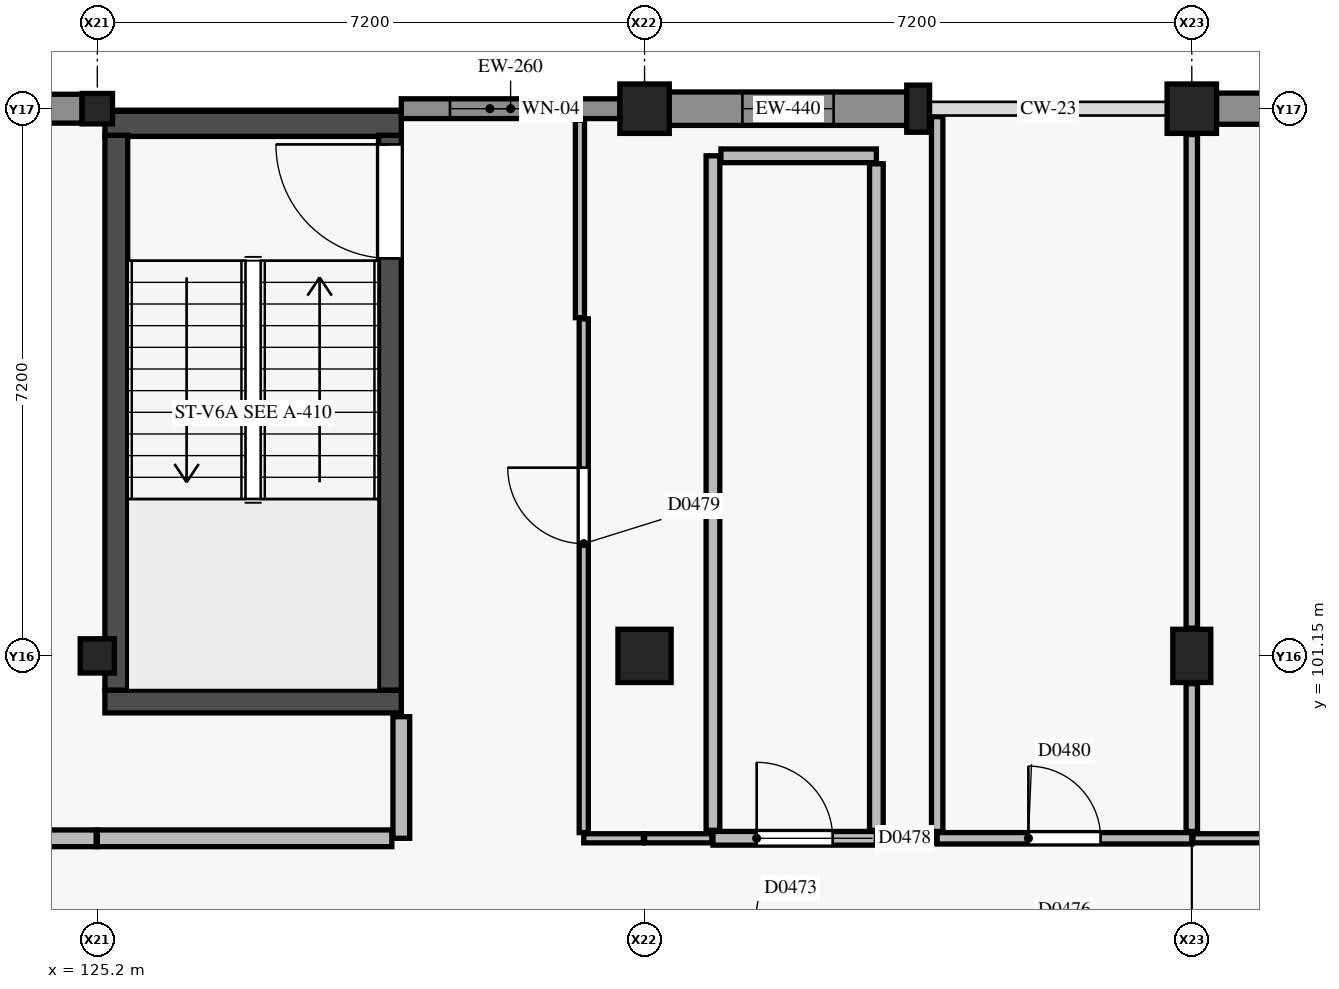
"""IFC4 building model, lengths in metres.
Left out: names, types, materials, properties, quantities, classifications, styles, units other than length and angle.
Written with IfcOpenShell. Run it as: python <this file> out.ifc"""

import sys

from ifc_helpers import new_model, si_unit, direction, frame, frame_2d, origin, origin_2d, place, context, subcontext, project, spatial, rectangle, circle, extrude, element, fill, save


model = new_model("IFC4")
c1 = context("Model", 3, precision=1e-05, world=origin(), true_north=direction((0.0, 1.0)))
c2 = subcontext(c1, "Body", "Model", "MODEL_VIEW")
j1 = project(units=[si_unit("LENGTHUNIT", "METRE"), si_unit("PLANEANGLEUNIT", "RADIAN")], contexts=[c1])
p1 = place(None, origin())
s1 = spatial("IfcSite", under=j1, at=p1, CompositionType="ELEMENT")
p2 = place(p1, origin())
s2 = spatial("IfcBuilding", under=s1, at=p2, CompositionType="ELEMENT")
p3 = place(p2, frame((0.0, 0.0, 9.0)))
s3 = spatial("IfcBuildingStorey", under=s2, at=p3, CompositionType="ELEMENT", Elevation=9.0)
p4 = place(p3, frame((125.2, 101.15, 0.0), z_axis=(0.0, 0.0, 1.0), x_axis=(1.0, 0.0, 0.0)))
e1 = element("IfcColumn", 1, at=p4, inside=s3, PredefinedType="COLUMN", context=c2, shape_type="SweptSolid", body=[
    extrude(rectangle(XDim=0.45, YDim=0.45, at=origin_2d()), origin(), (0.0, 0.0, 1.0), 4.2),
])
p5 = place(p3, frame((125.2, 108.35, 0.0), z_axis=(0.0, 0.0, 1.0), x_axis=(1.0, 0.0, 0.0)))
e2 = element("IfcColumn", 2, at=p5, inside=s3, PredefinedType="COLUMN", context=c2, shape_type="SweptSolid", body=[
    extrude(rectangle(XDim=0.4, YDim=0.4, at=origin_2d()), origin(), (0.0, 0.0, 1.0), 4.2),
])
p6 = place(p3, frame((132.4, 101.15, 0.0), z_axis=(0.0, 0.0, 1.0), x_axis=(1.0, 0.0, 0.0)))
e3 = element("IfcColumn", 3, at=p6, inside=s3, PredefinedType="COLUMN", context=c2, shape_type="SweptSolid", body=[
    extrude(rectangle(XDim=0.7, YDim=0.7, at=origin_2d()), origin(), (0.0, 0.0, 1.0), 4.2),
])
p7 = place(p3, frame((132.4, 108.35, 0.0), z_axis=(0.0, 0.0, 1.0), x_axis=(1.0, 0.0, 0.0)))
e4 = element("IfcColumn", 4, at=p7, inside=s3, PredefinedType="COLUMN", context=c2, shape_type="SweptSolid", body=[
    extrude(rectangle(XDim=0.65, YDim=0.65, at=origin_2d()), origin(), (0.0, 0.0, 1.0), 4.2),
])
p8 = place(p3, frame((139.6, 101.15, 0.0), z_axis=(0.0, 0.0, 1.0), x_axis=(1.0, 0.0, 0.0)))
e5 = element("IfcColumn", 5, at=p8, inside=s3, PredefinedType="COLUMN", context=c2, shape_type="SweptSolid", body=[
    extrude(rectangle(XDim=0.5, YDim=0.7, at=origin_2d()), origin(), (0.0, 0.0, 1.0), 4.2),
])
p9 = place(p3, frame((139.6, 108.35, 0.0), z_axis=(0.0, 0.0, 1.0), x_axis=(1.0, 0.0, 0.0)))
e6 = element("IfcColumn", 6, at=p9, inside=s3, PredefinedType="COLUMN", context=c2, shape_type="SweptSolid", body=[
    extrude(circle(Radius=0.325, at=origin_2d()), origin(), (0.0, 0.0, 1.0), 4.2),
])
p10 = place(p3, frame((136.0, 108.35, 0.0), z_axis=(0.0, 0.0, 1.0), x_axis=(1.0, 0.0, 0.0)))
e7 = element("IfcColumn", 7, at=p10, inside=s3, PredefinedType="PILASTER", context=c2, shape_type="SweptSolid", body=[
    extrude(rectangle(XDim=0.3, YDim=0.62, at=origin_2d()), origin(), (0.0, 0.0, 1.0), 4.2),
])
p11 = place(p3, frame((125.3, 100.55, 0.0), z_axis=(0.0, 0.0, 1.0), x_axis=(1.0, 0.0, 0.0)))
e8 = element("IfcWall", 8, at=p11, inside=s3, PredefinedType="SHEAR", context=c2, shape_type="SweptSolid", body=[
    extrude(rectangle(XDim=3.9, YDim=0.3, at=frame_2d((1.95, 0.0))), origin(), (0.0, 0.0, 1.0), 3.95),
])
p12 = place(p3, frame((125.3, 108.15, 0.0), z_axis=(0.0, 0.0, 1.0), x_axis=(1.0, 0.0, 0.0)))
e9 = element("IfcWall", 9, at=p12, inside=s3, PredefinedType="SHEAR", context=c2, shape_type="SweptSolid", body=[
    extrude(rectangle(XDim=3.9, YDim=0.33, at=frame_2d((1.95, 0.0))), origin(), (0.0, 0.0, 1.0), 3.95),
])
p13 = place(p3, frame((125.45, 100.7, 0.0), z_axis=(0.0, 0.0, 1.0), x_axis=(0.0, 1.0, 0.0)))
e10 = element("IfcWall", 10, at=p13, inside=s3, PredefinedType="SHEAR", context=c2, shape_type="SweptSolid", body=[
    extrude(rectangle(XDim=7.3, YDim=0.3, at=frame_2d((3.65, 0.0))), origin(), (0.0, 0.0, 1.0), 3.95),
])
p14 = place(p3, frame((129.05, 100.7, 0.0), z_axis=(0.0, 0.0, 1.0), x_axis=(0.0, 1.0, 0.0)))
e11 = element("IfcWall", 11, at=p14, inside=s3, PredefinedType="SHEAR", context=c2, shape_type="SweptSolid", body=[
    extrude(rectangle(XDim=7.3, YDim=0.3, at=frame_2d((3.65, 0.0))), origin(), (0.0, 0.0, 1.0), 3.95),
])
p15 = place(p14, frame((5.68, 0.0, 0.0)))
e12 = element("IfcOpeningElement", 12, at=p15, cuts=e11, PredefinedType="OPENING", context=c2, shape_type="SweptSolid", body=[
    extrude(rectangle(XDim=1.5, YDim=2.15, at=frame_2d((0.75, 1.075))), frame((0.0, 0.16, 0.0), z_axis=(0.0, -1.0, 0.0), x_axis=(1.0, 0.0, 0.0)), (0.0, 0.0, 1.0), 0.32),
])
p16 = place(p3, frame((121.77, 108.35, 0.0), z_axis=(0.0, 0.0, 1.0), x_axis=(1.0, 0.0, 0.0)))
e13 = element("IfcWall", 13, at=p16, inside=s3, PredefinedType="USERDEFINED", context=c2, shape_type="SweptSolid", body=[
    extrude(rectangle(XDim=3.23, YDim=0.38, at=frame_2d((1.615, 0.0))), origin(), (0.0, 0.0, 1.0), 3.13),
])
p17 = place(p16, frame((1.165, 0.0, 0.9)))
e14 = element("IfcOpeningElement", 14, at=p17, cuts=e13, PredefinedType="OPENING", context=c2, shape_type="SweptSolid", body=[
    extrude(rectangle(XDim=0.9, YDim=1.8, at=frame_2d((0.45, 0.9))), frame((0.0, 0.2, 0.0), z_axis=(0.0, -1.0, 0.0), x_axis=(1.0, 0.0, 0.0)), (0.0, 0.0, 1.0), 0.4),
])
p18 = place(p3, frame((129.2, 108.35, 0.0), z_axis=(0.0, 0.0, 1.0), x_axis=(1.0, 0.0, 0.0)))
e15 = element("IfcWall", 15, at=p18, inside=s3, PredefinedType="SOLIDWALL", context=c2, shape_type="SweptSolid", body=[
    extrude(rectangle(XDim=2.875, YDim=0.26, at=frame_2d((1.438, 0.0))), origin(), (0.0, 0.0, 1.0), 3.13),
])
p19 = place(p18, frame((0.64, 0.0, 0.9)))
e16 = element("IfcOpeningElement", 16, at=p19, cuts=e15, PredefinedType="OPENING", context=c2, shape_type="SweptSolid", body=[
    extrude(rectangle(XDim=1.05, YDim=1.8, at=frame_2d((0.525, 0.9))), frame((0.0, 0.14, 0.0), z_axis=(0.0, -1.0, 0.0), x_axis=(1.0, 0.0, 0.0)), (0.0, 0.0, 1.0), 0.28),
])
p20 = place(p3, frame((132.725, 108.35, 0.0), z_axis=(0.0, 0.0, 1.0), x_axis=(1.0, 0.0, 0.0)))
e17 = element("IfcWall", 17, at=p20, inside=s3, PredefinedType="USERDEFINED", context=c2, shape_type="SweptSolid", body=[
    extrude(rectangle(XDim=3.125, YDim=0.44, at=frame_2d((1.562, 0.0))), origin(), (0.0, 0.0, 1.0), 3.13),
])
p21 = place(p20, frame((0.962, 0.0, 0.9)))
e18 = element("IfcOpeningElement", 18, at=p21, cuts=e17, PredefinedType="OPENING", context=c2, shape_type="SweptSolid", body=[
    extrude(rectangle(XDim=1.2, YDim=1.8, at=frame_2d((0.6, 0.9))), frame((0.0, 0.23, 0.0), z_axis=(0.0, -1.0, 0.0), x_axis=(1.0, 0.0, 0.0)), (0.0, 0.0, 1.0), 0.46),
])
p22 = place(p3, frame((139.925, 108.35, 0.0), z_axis=(0.0, 0.0, 1.0), x_axis=(1.0, 0.0, 0.0)))
e19 = element("IfcWall", 19, at=p22, inside=s3, PredefinedType="USERDEFINED", context=c2, shape_type="SweptSolid", body=[
    extrude(rectangle(XDim=6.6, YDim=0.41, at=frame_2d((3.3, 0.0))), origin(), (0.0, 0.0, 1.0), 3.13),
])
p23 = place(p22, frame((2.4, 0.0, 0.9)))
e20 = element("IfcOpeningElement", 20, at=p23, cuts=e19, PredefinedType="OPENING", context=c2, shape_type="SweptSolid", body=[
    extrude(rectangle(XDim=1.8, YDim=0.9, at=frame_2d((0.9, 0.45))), frame((0.0, 0.215, 0.0), z_axis=(0.0, -1.0, 0.0), x_axis=(1.0, 0.0, 0.0)), (0.0, 0.0, 1.0), 0.43),
])
p24 = place(p3, frame((133.3, 98.75, 0.0), z_axis=(0.0, 0.0, 1.0), x_axis=(1.0, 0.0, 0.0)))
e21 = element("IfcWall", 21, at=p24, inside=s3, PredefinedType="PLUMBINGWALL", context=c2, shape_type="SweptSolid", body=[
    extrude(rectangle(XDim=2.15, YDim=0.18, at=frame_2d((1.075, 0.0))), origin(), (0.0, 0.0, 1.0), 3.515),
])
p25 = place(p24, frame((0.575, 0.0, 0.0)))
e22 = element("IfcOpeningElement", 22, at=p25, cuts=e21, PredefinedType="OPENING", context=c2, shape_type="SweptSolid", body=[
    extrude(rectangle(XDim=1.0, YDim=2.15, at=frame_2d((0.5, 1.075))), frame((0.0, 0.1, 0.0), z_axis=(0.0, -1.0, 0.0), x_axis=(1.0, 0.0, 0.0)), (0.0, 0.0, 1.0), 0.2),
])
p26 = place(p3, frame((133.3, 98.855, 0.0), z_axis=(0.0, 0.0, 1.0), x_axis=(0.0, 1.0, 0.0)))
e23 = element("IfcWall", 23, at=p26, inside=s3, PredefinedType="PLUMBINGWALL", context=c2, shape_type="SweptSolid", body=[
    extrude(rectangle(XDim=8.875, YDim=0.18, at=frame_2d((4.438, 0.0))), origin(), (0.0, 0.0, 1.0), 3.285),
])
p27 = place(p3, frame((133.405, 107.73, 0.0), z_axis=(0.0, 0.0, 1.0), x_axis=(1.0, 0.0, 0.0)))
e24 = element("IfcWall", 24, at=p27, inside=s3, PredefinedType="PLUMBINGWALL", context=c2, shape_type="SweptSolid", body=[
    extrude(rectangle(XDim=2.045, YDim=0.18, at=frame_2d((1.022, 0.0))), origin(), (0.0, 0.0, 1.0), 3.95),
])
p28 = place(p3, frame((135.45, 98.855, 0.0), z_axis=(0.0, 0.0, 1.0), x_axis=(0.0, 1.0, 0.0)))
e25 = element("IfcWall", 25, at=p28, inside=s3, PredefinedType="PLUMBINGWALL", context=c2, shape_type="SweptSolid", body=[
    extrude(rectangle(XDim=8.77, YDim=0.18, at=frame_2d((4.385, 0.0))), origin(), (0.0, 0.0, 1.0), 3.285),
])
p29 = place(p3, frame((129.2, 98.75, 0.0), z_axis=(0.0, 0.0, 1.0), x_axis=(0.0, 1.0, 0.0)))
e26 = element("IfcWall", 26, at=p29, inside=s3, PredefinedType="PARTITIONING", context=c2, shape_type="SweptSolid", body=[
    extrude(rectangle(XDim=1.6, YDim=0.22, at=frame_2d((0.8, 0.0))), origin(), (0.0, 0.0, 1.0), 3.475),
])
p30 = place(p3, frame((125.2, 98.75, 0.0), z_axis=(0.0, 0.0, 1.0), x_axis=(1.0, 0.0, 0.0)))
e27 = element("IfcWall", 27, at=p30, inside=s3, PredefinedType="PARTITIONING", context=c2, shape_type="SweptSolid", body=[
    extrude(rectangle(XDim=3.875, YDim=0.22, at=frame_2d((1.938, 0.0))), origin(), (0.0, 0.0, 1.0), 3.215),
])
p31 = place(p3, frame((122.925, 98.75, 0.0), z_axis=(0.0, 0.0, 1.0), x_axis=(1.0, 0.0, 0.0)))
e28 = element("IfcWall", 28, at=p31, inside=s3, PredefinedType="PARTITIONING", context=c2, shape_type="SweptSolid", body=[
    extrude(rectangle(XDim=2.26, YDim=0.22, at=frame_2d((1.13, 0.0))), origin(), (0.0, 0.0, 1.0), 3.215),
])
p32 = place(p3, frame((136.25, 98.75, 0.0), z_axis=(0.0, 0.0, 1.0), x_axis=(1.0, 0.0, 0.0)))
e29 = element("IfcWall", 29, at=p32, inside=s3, PredefinedType="PARTITIONING", context=c2, shape_type="SweptSolid", body=[
    extrude(rectangle(XDim=3.35, YDim=0.15, at=frame_2d((1.675, 0.0))), origin(), (0.0, 0.0, 1.0), 3.285),
])
p33 = place(p32, frame((1.2, 0.0, 0.0)))
e30 = element("IfcOpeningElement", 30, at=p33, cuts=e29, PredefinedType="OPENING", context=c2, shape_type="SweptSolid", body=[
    extrude(rectangle(XDim=0.95, YDim=2.1, at=frame_2d((0.475, 1.05))), frame((0.0, 0.085, 0.0), z_axis=(0.0, -1.0, 0.0), x_axis=(1.0, 0.0, 0.0)), (0.0, 0.0, 1.0), 0.17),
])
p34 = place(p3, frame((139.615, 98.75, 0.0), z_axis=(0.0, 0.0, 1.0), x_axis=(1.0, 0.0, 0.0)))
e31 = element("IfcWall", 31, at=p34, inside=s3, PredefinedType="PARTITIONING", context=c2, shape_type="SweptSolid", body=[
    extrude(rectangle(XDim=4.71, YDim=0.12, at=frame_2d((2.355, 0.0))), origin(), (0.0, 0.0, 1.0), 3.285),
])
p35 = place(p34, frame((1.78, 0.0, 0.0)))
e32 = element("IfcOpeningElement", 32, at=p35, cuts=e31, PredefinedType="OPENING", context=c2, shape_type="SweptSolid", body=[
    extrude(rectangle(XDim=1.15, YDim=2.15, at=frame_2d((0.575, 1.075))), frame((0.0, 0.07, 0.0), z_axis=(0.0, -1.0, 0.0), x_axis=(1.0, 0.0, 0.0)), (0.0, 0.0, 1.0), 0.14),
])
p36 = place(p3, frame((131.55, 105.6, 0.0), z_axis=(0.0, 0.0, 1.0), x_axis=(0.0, 1.0, 0.0)))
e33 = element("IfcWall", 33, at=p36, inside=s3, PredefinedType="PARTITIONING", context=c2, shape_type="SweptSolid", body=[
    extrude(rectangle(XDim=2.6, YDim=0.12, at=frame_2d((1.3, 0.0))), origin(), (0.0, 0.0, 1.0), 3.95),
])
p37 = place(p3, frame((135.465, 98.75, 0.0), z_axis=(0.0, 0.0, 1.0), x_axis=(1.0, 0.0, 0.0)))
e34 = element("IfcWall", 34, at=p37, inside=s3, PredefinedType="PARTITIONING", context=c2, shape_type="SweptSolid", body=[
    extrude(rectangle(XDim=0.77, YDim=0.12, at=frame_2d((0.385, 0.0))), origin(), (0.0, 0.0, 1.0), 3.515),
])
p38 = place(p3, frame((132.4, 98.75, 0.0), z_axis=(0.0, 0.0, 1.0), x_axis=(1.0, 0.0, 0.0)))
e35 = element("IfcWall", 35, at=p38, inside=s3, PredefinedType="PARTITIONING", context=c2, shape_type="SweptSolid", body=[
    extrude(rectangle(XDim=0.885, YDim=0.12, at=frame_2d((0.442, 0.0))), origin(), (0.0, 0.0, 1.0), 3.415),
])
p39 = place(p3, frame((131.6, 98.75, 0.0), z_axis=(0.0, 0.0, 1.0), x_axis=(1.0, 0.0, 0.0)))
e36 = element("IfcWall", 36, at=p39, inside=s3, PredefinedType="PARTITIONING", context=c2, shape_type="SweptSolid", body=[
    extrude(rectangle(XDim=0.785, YDim=0.12, at=frame_2d((0.393, 0.0))), origin(), (0.0, 0.0, 1.0), 3.415),
])
p40 = place(p3, frame((131.6, 98.825, 0.0), z_axis=(0.0, 0.0, 1.0), x_axis=(0.0, 1.0, 0.0)))
e37 = element("IfcWall", 37, at=p40, inside=s3, PredefinedType="PARTITIONING", context=c2, shape_type="SweptSolid", body=[
    extrude(rectangle(XDim=6.76, YDim=0.12, at=frame_2d((3.38, 0.0))), origin(), (0.0, 0.0, 1.0), 3.95),
])
p41 = place(p40, frame((3.802, 0.0, 0.0)))
e38 = element("IfcOpeningElement", 38, at=p41, cuts=e37, PredefinedType="OPENING", context=c2, shape_type="SweptSolid", body=[
    extrude(rectangle(XDim=1.0, YDim=2.15, at=frame_2d((0.5, 1.075))), frame((0.0, 0.07, 0.0), z_axis=(0.0, -1.0, 0.0), x_axis=(1.0, 0.0, 0.0)), (0.0, 0.0, 1.0), 0.14),
])
p42 = place(p3, frame((139.6, 98.84, 0.0), z_axis=(0.0, 0.0, 1.0), x_axis=(0.0, 1.0, 0.0)))
e39 = element("IfcWall", 39, at=p42, inside=s3, PredefinedType="PARTITIONING", context=c2, shape_type="SweptSolid", body=[
    extrude(rectangle(XDim=1.945, YDim=0.15, at=frame_2d((0.972, 0.0))), origin(), (0.0, 0.0, 1.0), 3.285),
])
p43 = place(p3, frame((139.6, 101.515, 0.0), z_axis=(0.0, 0.0, 1.0), x_axis=(0.0, 1.0, 0.0)))
e40 = element("IfcWall", 40, at=p43, inside=s3, PredefinedType="PARTITIONING", context=c2, shape_type="SweptSolid", body=[
    extrude(rectangle(XDim=6.495, YDim=0.15, at=frame_2d((3.248, 0.0))), origin(), (0.0, 0.0, 1.0), 3.285),
])
p44 = place(p3, frame((136.25, 98.84, 0.0), z_axis=(0.0, 0.0, 1.0), x_axis=(0.0, 1.0, 0.0)))
e41 = element("IfcWall", 41, at=p44, inside=s3, PredefinedType="PARTITIONING", context=c2, shape_type="SweptSolid", body=[
    extrude(rectangle(XDim=9.405, YDim=0.15, at=frame_2d((4.703, 0.0))), origin(), (0.0, 0.0, 1.0), 3.285),
])
p45 = place(p19, origin())
e42 = element("IfcWindow", 42, at=p45, inside=s3, PartitioningType="SINGLE_PANEL", PredefinedType="WINDOW", context=c2, shape_type="SweptSolid", body=[
    extrude(rectangle(XDim=1.05, YDim=1.8, at=frame_2d((0.525, 0.9))), frame((0.0, 0.03, 0.0), z_axis=(0.0, -1.0, 0.0), x_axis=(1.0, 0.0, 0.0)), (0.0, 0.0, 1.0), 0.06),
])
fill(e16, e42)
p46 = place(p21, origin())
e43 = element("IfcWindow", 43, at=p46, inside=s3, PartitioningType="SINGLE_PANEL", PredefinedType="WINDOW", context=c2, shape_type="SweptSolid", body=[
    extrude(rectangle(XDim=1.2, YDim=1.8, at=frame_2d((0.6, 0.9))), frame((0.0, 0.03, 0.0), z_axis=(0.0, -1.0, 0.0), x_axis=(1.0, 0.0, 0.0)), (0.0, 0.0, 1.0), 0.06),
])
fill(e18, e43)
p47 = place(p15, origin())
e44 = element("IfcDoor", 44, at=p47, inside=s3, OperationType="SINGLE_SWING_RIGHT", PredefinedType="DOOR", context=c2, shape_type="SweptSolid", body=[
    extrude(rectangle(XDim=1.5, YDim=2.15, at=frame_2d((0.75, 1.075))), frame((0.0, 0.025, 0.0), z_axis=(0.0, -1.0, 0.0), x_axis=(1.0, 0.0, 0.0)), (0.0, 0.0, 1.0), 0.05),
])
fill(e12, e44)
p48 = place(p25, origin())
e45 = element("IfcDoor", 45, at=p48, inside=s3, OperationType="SINGLE_SWING_LEFT", PredefinedType="DOOR", context=c2, shape_type="SweptSolid", body=[
    extrude(rectangle(XDim=1.0, YDim=2.15, at=frame_2d((0.5, 1.075))), frame((0.0, 0.025, 0.0), z_axis=(0.0, -1.0, 0.0), x_axis=(1.0, 0.0, 0.0)), (0.0, 0.0, 1.0), 0.05),
])
fill(e22, e45)
p49 = place(p41, origin())
e46 = element("IfcDoor", 46, at=p49, inside=s3, OperationType="SINGLE_SWING_RIGHT", PredefinedType="DOOR", context=c2, shape_type="SweptSolid", body=[
    extrude(rectangle(XDim=1.0, YDim=2.15, at=frame_2d((0.5, 1.075))), frame((0.0, 0.025, 0.0), z_axis=(0.0, -1.0, 0.0), x_axis=(1.0, 0.0, 0.0)), (0.0, 0.0, 1.0), 0.05),
])
fill(e38, e46)
p50 = place(p33, origin())
e47 = element("IfcDoor", 47, at=p50, inside=s3, OperationType="SINGLE_SWING_LEFT", PredefinedType="DOOR", context=c2, shape_type="SweptSolid", body=[
    extrude(rectangle(XDim=0.95, YDim=2.1, at=frame_2d((0.475, 1.05))), frame((0.0, 0.025, 0.0), z_axis=(0.0, -1.0, 0.0), x_axis=(1.0, 0.0, 0.0)), (0.0, 0.0, 1.0), 0.05),
])
fill(e30, e47)
save(model, sys.argv[1])
